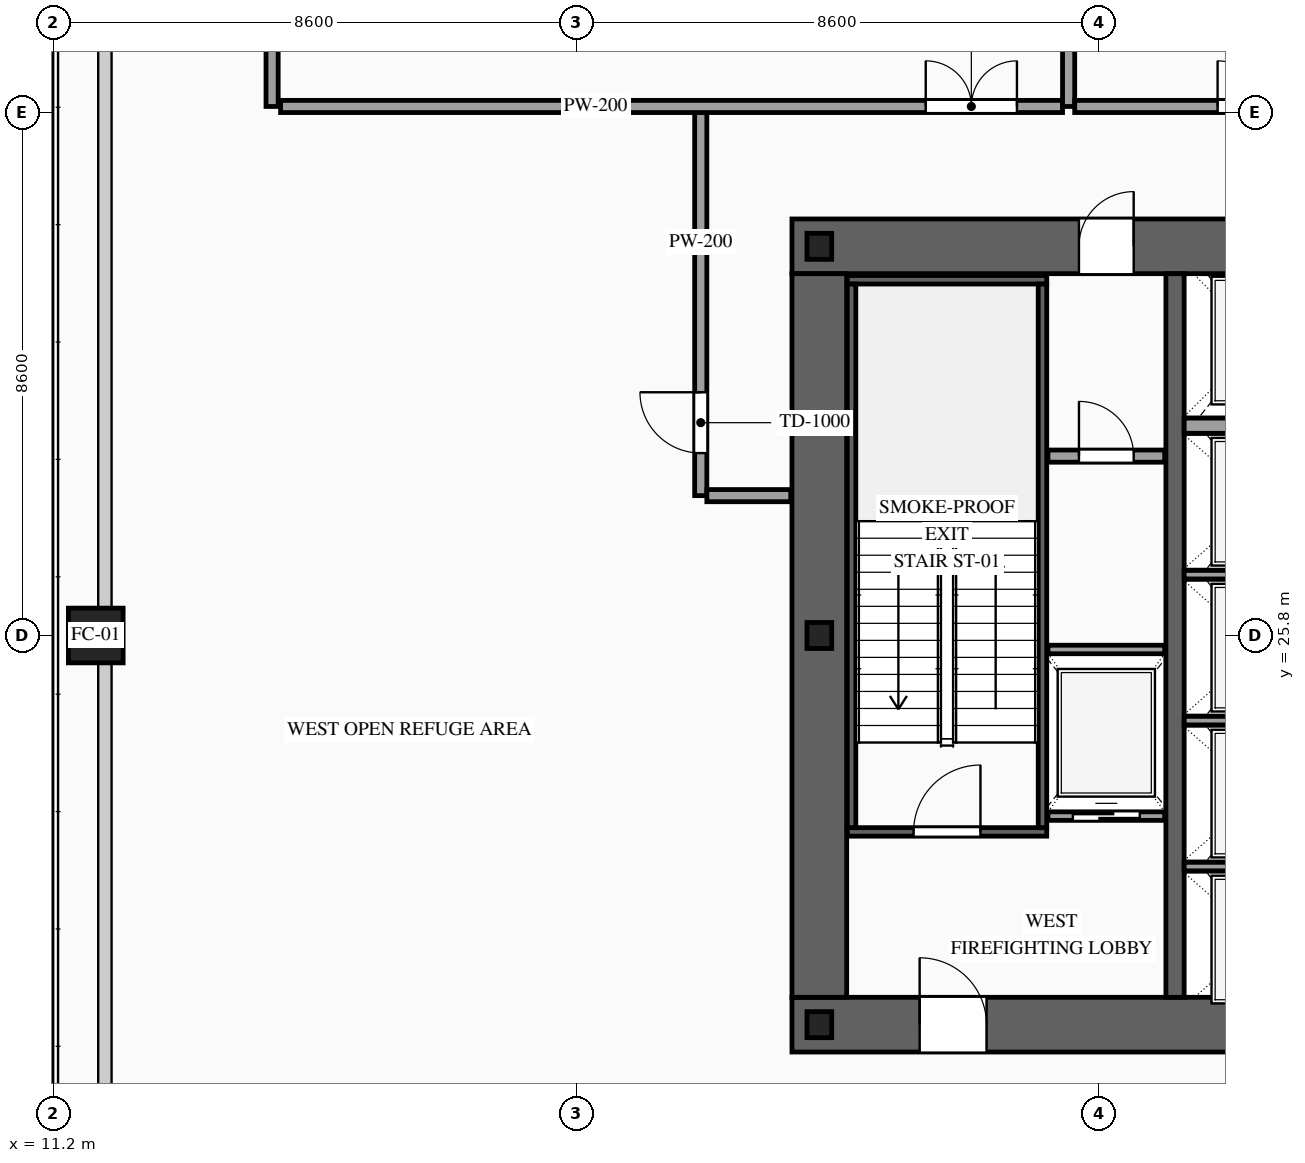
"""IFC4 building model, lengths in metres.
Left out: names, types, materials, properties, quantities, classifications, styles, units other than length and angle.
Written with IfcOpenShell. Run it as: python <this file> out.ifc"""

import sys

from ifc_helpers import new_model, si_unit, direction, frame, frame_2d, origin, origin_2d, place, context, subcontext, project, spatial, rectangle, hollow_rectangle, i_section, extrude, source, transform, mapped, element, fill, save


model = new_model("IFC4")
c1 = context("Model", 3, precision=1e-05, world=origin(), true_north=direction((0.0, 1.0)))
c2 = subcontext(c1, "Body", "Model", "MODEL_VIEW")
j1 = project(units=[si_unit("LENGTHUNIT", "METRE"), si_unit("PLANEANGLEUNIT", "RADIAN")], contexts=[c1])
p1 = place(None, origin())
s1 = spatial("IfcSite", under=j1, at=p1, CompositionType="ELEMENT")
p2 = place(p1, origin())
s2 = spatial("IfcBuilding", under=s1, at=p2, CompositionType="ELEMENT")
p3 = place(p2, frame((0.0, 0.0, 41.4)))
s3 = spatial("IfcBuildingStorey", under=s2, at=p3, CompositionType="ELEMENT", Elevation=41.4)
p4 = place(p3, frame((23.35, 19.4, 0.0), z_axis=(0.0, 0.0, 1.0), x_axis=(1.0, 0.0, 0.0)))
e1 = element("IfcWall", 1, at=p4, inside=s3, PredefinedType="SHEAR", context=c2, shape_type="SweptSolid", body=[
    extrude(rectangle(XDim=27.3, YDim=0.9, at=frame_2d((13.65, 0.0))), origin(), (0.0, 0.0, 1.0), 4.6),
])
p5 = place(p4, frame((2.1, 0.0, 0.0)))
e2 = element("IfcOpeningElement", 2, at=p5, cuts=e1, PredefinedType="OPENING", context=c2, shape_type="SweptSolid", body=[
    extrude(rectangle(XDim=1.1, YDim=2.2, at=frame_2d((0.55, 1.1))), frame((0.0, 0.465, 0.0), z_axis=(0.0, -1.0, 0.0), x_axis=(1.0, 0.0, 0.0)), (0.0, 0.0, 1.0), 0.93),
])
p6 = place(p4, frame((10.0, 0.0, 0.0)))
e3 = element("IfcOpeningElement", 3, at=p6, cuts=e1, PredefinedType="OPENING", context=c2, shape_type="SweptSolid", body=[
    extrude(rectangle(XDim=1.1, YDim=2.2, at=frame_2d((0.55, 1.1))), frame((0.0, 0.465, 0.0), z_axis=(0.0, -1.0, 0.0), x_axis=(1.0, 0.0, 0.0)), (0.0, 0.0, 1.0), 0.93),
])
p7 = place(p4, frame((23.2, 0.0, 0.0)))
e4 = element("IfcOpeningElement", 4, at=p7, cuts=e1, PredefinedType="OPENING", context=c2, shape_type="SweptSolid", body=[
    extrude(rectangle(XDim=1.1, YDim=2.2, at=frame_2d((0.55, 1.1))), frame((0.0, 0.465, 0.0), z_axis=(0.0, -1.0, 0.0), x_axis=(1.0, 0.0, 0.0)), (0.0, 0.0, 1.0), 0.93),
])
p8 = place(p4, frame((19.82, 0.0, 0.0)))
e5 = element("IfcOpeningElement", 5, at=p8, cuts=e1, PredefinedType="OPENING", context=c2, shape_type="SweptSolid", body=[
    extrude(rectangle(XDim=0.9, YDim=2.15, at=frame_2d((0.45, 1.075))), frame((0.0, 0.465, 0.0), z_axis=(0.0, -1.0, 0.0), x_axis=(1.0, 0.0, 0.0)), (0.0, 0.0, 1.0), 0.93),
])
p9 = place(p3, frame((23.35, 32.2, 0.0), z_axis=(0.0, 0.0, 1.0), x_axis=(1.0, 0.0, 0.0)))
e6 = element("IfcWall", 6, at=p9, inside=s3, PredefinedType="SHEAR", context=c2, shape_type="SweptSolid", body=[
    extrude(rectangle(XDim=27.3, YDim=0.9, at=frame_2d((13.65, 0.0))), origin(), (0.0, 0.0, 1.0), 4.6),
])
p10 = place(p9, frame((4.72, 0.0, 0.0)))
e7 = element("IfcOpeningElement", 7, at=p10, cuts=e6, PredefinedType="OPENING", context=c2, shape_type="SweptSolid", body=[
    extrude(rectangle(XDim=0.9, YDim=2.15, at=frame_2d((0.45, 1.075))), frame((0.0, 0.465, 0.0), z_axis=(0.0, -1.0, 0.0), x_axis=(1.0, 0.0, 0.0)), (0.0, 0.0, 1.0), 0.93),
])
p11 = place(p9, frame((10.0, 0.0, 0.0)))
e8 = element("IfcOpeningElement", 8, at=p11, cuts=e6, PredefinedType="OPENING", context=c2, shape_type="SweptSolid", body=[
    extrude(rectangle(XDim=1.1, YDim=2.2, at=frame_2d((0.55, 1.1))), frame((0.0, 0.465, 0.0), z_axis=(0.0, -1.0, 0.0), x_axis=(1.0, 0.0, 0.0)), (0.0, 0.0, 1.0), 0.93),
])
p12 = place(p9, frame((15.85, 0.0, 0.0)))
e9 = element("IfcOpeningElement", 9, at=p12, cuts=e6, PredefinedType="OPENING", context=c2, shape_type="SweptSolid", body=[
    extrude(rectangle(XDim=1.1, YDim=2.2, at=frame_2d((0.55, 1.1))), frame((0.0, 0.465, 0.0), z_axis=(0.0, -1.0, 0.0), x_axis=(1.0, 0.0, 0.0)), (0.0, 0.0, 1.0), 0.93),
])
p13 = place(p9, frame((19.05, 0.0, 0.0)))
e10 = element("IfcOpeningElement", 10, at=p13, cuts=e6, PredefinedType="OPENING", context=c2, shape_type="SweptSolid", body=[
    extrude(rectangle(XDim=0.9, YDim=2.15, at=frame_2d((0.45, 1.075))), frame((0.0, 0.465, 0.0), z_axis=(0.0, -1.0, 0.0), x_axis=(1.0, 0.0, 0.0)), (0.0, 0.0, 1.0), 0.93),
])
m1 = source(origin(), c2, "Body", "SweptSolid", [
    extrude(rectangle(XDim=11.9, YDim=0.9, at=frame_2d((5.95, 0.0))), origin(), (0.0, 0.0, 1.0), 4.6),
])
p14 = place(p3, frame((23.8, 19.85, 0.0), z_axis=(0.0, 0.0, 1.0), x_axis=(0.0, 1.0, 0.0)))
e11 = element("IfcWall", 11, at=p14, inside=s3, PredefinedType="SHEAR", context=c2, shape_type="MappedRepresentation", body=[
    mapped(m1, transform((0.0, 0.0, 0.0), scale=1.0)),
])
m2 = source(origin(), c2, "Body", "SweptSolid", [
    extrude(rectangle(XDim=11.9, YDim=0.3, at=frame_2d((5.95, 0.0))), origin(), (0.0, 0.0, 1.0), 4.6),
])
p15 = place(p3, frame((29.65, 19.85, 0.0), z_axis=(0.0, 0.0, 1.0), x_axis=(0.0, 1.0, 0.0)))
e12 = element("IfcWall", 12, at=p15, inside=s3, PredefinedType="SOLIDWALL", context=c2, shape_type="MappedRepresentation", body=[
    mapped(m2, transform((0.0, 0.0, 0.0), scale=1.0)),
])
m3 = source(origin(), c2, "Body", "SweptSolid", [
    extrude(i_section(OverallWidth=0.407, OverallDepth=0.428, WebThickness=0.02, FlangeThickness=0.035, at=origin_2d()), origin(), (0.0, 0.0, 1.0), 4.6),
])
for number, where, z_axis, x_axis in (
    (13, (23.8, 19.4, 0.0), (0.0, 0.0, 1.0), (1.0, 0.0, 0.0)),
    (14, (23.8, 25.8, 0.0), (0.0, 0.0, 1.0), (1.0, 0.0, 0.0)),
    (15, (23.8, 32.2, 0.0), (0.0, 0.0, 1.0), (1.0, 0.0, 0.0)),
):
    element("IfcColumn", number, at=place(p3, frame(where, z_axis=z_axis, x_axis=x_axis)), inside=s3, PredefinedType="COLUMN", context=c2, shape_type="MappedRepresentation", body=[
        mapped(m3, transform((0.0, 0.0, 0.0), scale=1.0)),
    ])
m4 = source(origin(), c2, "Body", "SweptSolid", [
    extrude(hollow_rectangle(XDim=0.9, YDim=0.9, WallThickness=0.042, at=origin_2d()), origin(), (0.0, 0.0, 1.0), 4.6),
])
p16 = place(p3, frame((11.9, 25.8, 0.0), z_axis=(0.0, 0.0, 1.0), x_axis=(1.0, 0.0, 0.0)))
e16 = element("IfcColumn", 16, at=p16, inside=s3, PredefinedType="COLUMN", context=c2, shape_type="MappedRepresentation", body=[
    mapped(m4, transform((0.0, 0.0, 0.0), scale=1.0)),
])
p17 = place(p3, frame((27.56, 22.83, 0.0), z_axis=(0.0, 0.0, 1.0), x_axis=(1.0, 0.0, 0.0)))
e17 = element("IfcWall", 17, at=p17, inside=s3, PredefinedType="SOLIDWALL", context=c2, shape_type="SweptSolid", body=[
    extrude(rectangle(XDim=1.92, YDim=0.14, at=frame_2d((0.96, 0.0))), origin(), (0.0, 0.0, 1.0), 4.38),
])
p18 = place(p17, frame((0.41, 0.0, 0.0)))
e18 = element("IfcOpeningElement", 18, at=p18, cuts=e17, PredefinedType="OPENING", context=c2, shape_type="SweptSolid", body=[
    extrude(rectangle(XDim=1.1, YDim=2.2, at=frame_2d((0.55, 1.1))), frame((0.0, 0.085, 0.0), z_axis=(0.0, -1.0, 0.0), x_axis=(1.0, 0.0, 0.0)), (0.0, 0.0, 1.0), 0.17),
])
m5 = source(origin(), c2, "Body", "SweptSolid", [
    extrude(rectangle(XDim=1.92, YDim=0.14, at=frame_2d((0.96, 0.0))), origin(), (0.0, 0.0, 1.0), 4.38),
])
p19 = place(p3, frame((27.56, 25.57, 0.0), z_axis=(0.0, 0.0, 1.0), x_axis=(1.0, 0.0, 0.0)))
e19 = element("IfcWall", 19, at=p19, inside=s3, PredefinedType="SOLIDWALL", context=c2, shape_type="MappedRepresentation", body=[
    mapped(m5, transform((0.0, 0.0, 0.0), scale=1.0)),
])
m6 = source(origin(), c2, "Body", "SweptSolid", [
    extrude(rectangle(XDim=2.5, YDim=0.14, at=frame_2d((1.25, 0.0))), origin(), (0.0, 0.0, 1.0), 4.38),
])
for number, where, z_axis, x_axis in (
    (20, (29.8, 22.0, 0.0), (0.0, 0.0, 1.0), (1.0, 0.0, 0.0)),
    (21, (29.8, 24.4, 0.0), (0.0, 0.0, 1.0), (1.0, 0.0, 0.0)),
    (22, (29.8, 26.8, 0.0), (0.0, 0.0, 1.0), (1.0, 0.0, 0.0)),
):
    element("IfcWall", number, at=place(p3, frame(where, z_axis=z_axis, x_axis=x_axis)), inside=s3, PredefinedType="SOLIDWALL", context=c2, shape_type="MappedRepresentation", body=[
        mapped(m6, transform((0.0, 0.0, 0.0), scale=1.0)),
    ])
m7 = source(origin(), c2, "Body", "SweptSolid", [
    extrude(rectangle(XDim=2.5, YDim=0.25, at=frame_2d((1.25, 0.0))), origin(), (0.0, 0.0, 1.0), 4.38),
])
p20 = place(p3, frame((29.8, 29.25, 0.0), z_axis=(0.0, 0.0, 1.0), x_axis=(1.0, 0.0, 0.0)))
e23 = element("IfcWall", 23, at=p20, inside=s3, PredefinedType="SOLIDWALL", context=c2, shape_type="MappedRepresentation", body=[
    mapped(m7, transform((0.0, 0.0, 0.0), scale=1.0)),
])
p21 = place(p3, frame((24.26, 22.57, 0.0), z_axis=(0.0, 0.0, 1.0), x_axis=(1.0, 0.0, 0.0)))
e24 = element("IfcWall", 24, at=p21, inside=s3, PredefinedType="SOLIDWALL", context=c2, shape_type="SweptSolid", body=[
    extrude(rectangle(XDim=3.28, YDim=0.14, at=frame_2d((1.64, 0.0))), origin(), (0.0, 0.0, 1.0), 4.38),
])
p22 = place(p21, frame((1.09, 0.0, 0.0)))
e25 = element("IfcOpeningElement", 25, at=p22, cuts=e24, PredefinedType="OPENING", context=c2, shape_type="SweptSolid", body=[
    extrude(rectangle(XDim=1.1, YDim=2.2, at=frame_2d((0.55, 1.1))), frame((0.0, 0.085, 0.0), z_axis=(0.0, -1.0, 0.0), x_axis=(1.0, 0.0, 0.0)), (0.0, 0.0, 1.0), 0.17),
])
m8 = source(origin(), c2, "Body", "SweptSolid", [
    extrude(rectangle(XDim=3.28, YDim=0.14, at=frame_2d((1.64, 0.0))), origin(), (0.0, 0.0, 1.0), 4.38),
])
p23 = place(p3, frame((24.26, 31.65, 0.0), z_axis=(0.0, 0.0, 1.0), x_axis=(1.0, 0.0, 0.0)))
e26 = element("IfcWall", 26, at=p23, inside=s3, PredefinedType="SOLIDWALL", context=c2, shape_type="MappedRepresentation", body=[
    mapped(m8, transform((0.0, 0.0, 0.0), scale=1.0)),
])
m9 = source(origin(), c2, "Body", "SweptSolid", [
    extrude(rectangle(XDim=8.94, YDim=0.14, at=frame_2d((4.47, 0.0))), origin(), (0.0, 0.0, 1.0), 4.38),
])
for number, where, z_axis, x_axis in (
    (27, (24.33, 22.64, 0.0), (0.0, 0.0, 1.0), (0.0, 1.0, 0.0)),
    (28, (27.47, 22.64, 0.0), (0.0, 0.0, 1.0), (0.0, 1.0, 0.0)),
):
    element("IfcWall", number, at=place(p3, frame(where, z_axis=z_axis, x_axis=x_axis)), inside=s3, PredefinedType="SOLIDWALL", context=c2, shape_type="MappedRepresentation", body=[
        mapped(m9, transform((0.0, 0.0, 0.0), scale=1.0)),
    ])
p24 = place(p3, frame((27.56, 28.75, 0.0), z_axis=(0.0, 0.0, 1.0), x_axis=(1.0, 0.0, 0.0)))
e29 = element("IfcWall", 29, at=p24, inside=s3, PredefinedType="PARTITIONING", context=c2, shape_type="SweptSolid", body=[
    extrude(rectangle(XDim=1.92, YDim=0.2, at=frame_2d((0.96, 0.0))), origin(), (0.0, 0.0, 1.0), 4.38),
])
p25 = place(p24, frame((0.51, 0.0, 0.0)))
e30 = element("IfcOpeningElement", 30, at=p25, cuts=e29, PredefinedType="OPENING", context=c2, shape_type="SweptSolid", body=[
    extrude(rectangle(XDim=0.9, YDim=2.15, at=frame_2d((0.45, 1.075))), frame((0.0, 0.115, 0.0), z_axis=(0.0, -1.0, 0.0), x_axis=(1.0, 0.0, 0.0)), (0.0, 0.0, 1.0), 0.23),
])
m10 = source(origin(), c2, "Body", "SweptSolid", [
    extrude(rectangle(XDim=16.1, YDim=0.2, at=frame_2d((8.05, 0.0))), origin(), (0.0, 0.0, 1.0), 4.38),
])
p26 = place(p3, frame((14.8, 34.5, 0.0), z_axis=(0.0, 0.0, 1.0), x_axis=(0.0, 1.0, 0.0)))
e31 = element("IfcWall", 31, at=p26, inside=s3, PredefinedType="PARTITIONING", context=c2, shape_type="MappedRepresentation", body=[
    mapped(m10, transform((0.0, 0.0, 0.0), scale=1.0)),
])
p27 = place(p3, frame((21.85, 28.1, 0.0), z_axis=(0.0, 0.0, 1.0), x_axis=(0.0, 1.0, 0.0)))
e32 = element("IfcWall", 32, at=p27, inside=s3, PredefinedType="PARTITIONING", context=c2, shape_type="SweptSolid", body=[
    extrude(rectangle(XDim=6.4, YDim=0.2, at=frame_2d((3.2, 0.0))), origin(), (0.0, 0.0, 1.0), 4.38),
])
p28 = place(p27, frame((0.7, 0.0, 0.0)))
e33 = element("IfcOpeningElement", 33, at=p28, cuts=e32, PredefinedType="OPENING", context=c2, shape_type="SweptSolid", body=[
    extrude(rectangle(XDim=1.0, YDim=2.2, at=frame_2d((0.5, 1.1))), frame((0.0, 0.115, 0.0), z_axis=(0.0, -1.0, 0.0), x_axis=(1.0, 0.0, 0.0)), (0.0, 0.0, 1.0), 0.23),
])
m11 = source(origin(), c2, "Body", "SweptSolid", [
    extrude(rectangle(XDim=1.38, YDim=0.2, at=frame_2d((0.69, 0.0))), origin(), (0.0, 0.0, 1.0), 4.38),
])
p29 = place(p3, frame((21.95, 28.1, 0.0), z_axis=(0.0, 0.0, 1.0), x_axis=(1.0, 0.0, 0.0)))
e34 = element("IfcWall", 34, at=p29, inside=s3, PredefinedType="PARTITIONING", context=c2, shape_type="MappedRepresentation", body=[
    mapped(m11, transform((0.0, 0.0, 0.0), scale=1.0)),
])
p30 = place(p3, frame((14.94, 34.5, 0.0), z_axis=(0.0, 0.0, 1.0), x_axis=(1.0, 0.0, 0.0)))
e35 = element("IfcWall", 35, at=p30, inside=s3, PredefinedType="PARTITIONING", context=c2, shape_type="SweptSolid", body=[
    extrude(rectangle(XDim=12.86, YDim=0.2, at=frame_2d((6.43, 0.0))), origin(), (0.0, 0.0, 1.0), 4.38),
])
p31 = place(p30, frame((10.61, 0.0, 0.0)))
e36 = element("IfcOpeningElement", 36, at=p31, cuts=e35, PredefinedType="OPENING", context=c2, shape_type="SweptSolid", body=[
    extrude(rectangle(XDim=1.5, YDim=2.3, at=frame_2d((0.75, 1.15))), frame((0.0, 0.115, 0.0), z_axis=(0.0, -1.0, 0.0), x_axis=(1.0, 0.0, 0.0)), (0.0, 0.0, 1.0), 0.23),
])
p32 = place(p3, frame((27.9, 34.5, 0.0), z_axis=(0.0, 0.0, 1.0), x_axis=(0.0, 1.0, 0.0)))
e37 = element("IfcWall", 37, at=p32, inside=s3, PredefinedType="PARTITIONING", context=c2, shape_type="MappedRepresentation", body=[
    mapped(m10, transform((0.0, 0.0, 0.0), scale=1.0)),
])
p33 = place(p3, frame((28.0, 34.5, 0.0), z_axis=(0.0, 0.0, 1.0), x_axis=(1.0, 0.0, 0.0)))
e38 = element("IfcWall", 38, at=p33, inside=s3, PredefinedType="PARTITIONING", context=c2, shape_type="SweptSolid", body=[
    extrude(rectangle(XDim=6.2, YDim=0.2, at=frame_2d((3.1, 0.0))), origin(), (0.0, 0.0, 1.0), 4.38),
])
p34 = place(p33, frame((2.35, 0.0, 0.0)))
e39 = element("IfcOpeningElement", 39, at=p34, cuts=e38, PredefinedType="OPENING", context=c2, shape_type="SweptSolid", body=[
    extrude(rectangle(XDim=1.5, YDim=2.3, at=frame_2d((0.75, 1.15))), frame((0.0, 0.115, 0.0), z_axis=(0.0, -1.0, 0.0), x_axis=(1.0, 0.0, 0.0)), (0.0, 0.0, 1.0), 0.23),
])
m12 = source(origin(), c2, "Body", "SweptSolid", [
    extrude(rectangle(XDim=1.1, YDim=2.2, at=frame_2d((0.55, 1.1))), frame((0.0, 0.025, 0.0), z_axis=(0.0, -1.0, 0.0), x_axis=(1.0, 0.0, 0.0)), (0.0, 0.0, 1.0), 0.05),
])
p35 = place(p18, origin())
e40 = element("IfcDoor", 40, at=p35, inside=s3, OperationType="SLIDING_TO_LEFT", PredefinedType="DOOR", context=c2, shape_type="MappedRepresentation", body=[
    mapped(m12, transform((0.0, 0.0, 0.0), scale=1.0)),
])
fill(e18, e40)
m13 = source(origin(), c2, "Body", "SweptSolid", [
    extrude(rectangle(XDim=1.1, YDim=2.2, at=frame_2d((0.55, 1.1))), frame((0.0, 0.025, 0.0), z_axis=(0.0, -1.0, 0.0), x_axis=(1.0, 0.0, 0.0)), (0.0, 0.0, 1.0), 0.05),
])
p36 = place(p22, origin())
e41 = element("IfcDoor", 41, at=p36, inside=s3, OperationType="SINGLE_SWING_RIGHT", PredefinedType="DOOR", context=c2, shape_type="MappedRepresentation", body=[
    mapped(m13, transform((0.0, 0.0, 0.0), scale=1.0)),
])
fill(e25, e41)
p37 = place(p5, origin())
e42 = element("IfcDoor", 42, at=p37, inside=s3, OperationType="SINGLE_SWING_LEFT", PredefinedType="DOOR", context=c2, shape_type="MappedRepresentation", body=[
    mapped(m13, transform((0.0, 0.0, 0.0), scale=1.0)),
])
fill(e2, e42)
m14 = source(origin(), c2, "Body", "SweptSolid", [
    extrude(rectangle(XDim=0.9, YDim=2.15, at=frame_2d((0.45, 1.075))), frame((0.0, 0.025, 0.0), z_axis=(0.0, -1.0, 0.0), x_axis=(1.0, 0.0, 0.0)), (0.0, 0.0, 1.0), 0.05),
])
p38 = place(p10, origin())
e43 = element("IfcDoor", 43, at=p38, inside=s3, OperationType="SINGLE_SWING_RIGHT", PredefinedType="DOOR", context=c2, shape_type="MappedRepresentation", body=[
    mapped(m14, transform((0.0, 0.0, 0.0), scale=1.0)),
])
fill(e7, e43)
p39 = place(p25, origin())
e44 = element("IfcDoor", 44, at=p39, inside=s3, OperationType="SINGLE_SWING_LEFT", PredefinedType="DOOR", context=c2, shape_type="MappedRepresentation", body=[
    mapped(m14, transform((0.0, 0.0, 0.0), scale=1.0)),
])
fill(e30, e44)
m15 = source(origin(), c2, "Body", "SweptSolid", [
    extrude(rectangle(XDim=1.0, YDim=2.2, at=frame_2d((0.5, 1.1))), frame((0.0, 0.025, 0.0), z_axis=(0.0, -1.0, 0.0), x_axis=(1.0, 0.0, 0.0)), (0.0, 0.0, 1.0), 0.05),
])
p40 = place(p28, origin())
e45 = element("IfcDoor", 45, at=p40, inside=s3, OperationType="SINGLE_SWING_RIGHT", PredefinedType="DOOR", context=c2, shape_type="MappedRepresentation", body=[
    mapped(m15, transform((0.0, 0.0, 0.0), scale=1.0)),
])
fill(e33, e45)
m16 = source(origin(), c2, "Body", "SweptSolid", [
    extrude(rectangle(XDim=1.5, YDim=2.3, at=frame_2d((0.75, 1.15))), frame((0.0, 0.025, 0.0), z_axis=(0.0, -1.0, 0.0), x_axis=(1.0, 0.0, 0.0)), (0.0, 0.0, 1.0), 0.05),
])
p41 = place(p31, origin())
e46 = element("IfcDoor", 46, at=p41, inside=s3, OperationType="DOUBLE_DOOR_SINGLE_SWING", PredefinedType="DOOR", context=c2, shape_type="MappedRepresentation", body=[
    mapped(m16, transform((0.0, 0.0, 0.0), scale=1.0)),
])
fill(e36, e46)
p42 = place(p34, origin())
e47 = element("IfcDoor", 47, at=p42, inside=s3, OperationType="DOUBLE_DOOR_SINGLE_SWING", PredefinedType="DOOR", context=c2, shape_type="MappedRepresentation", body=[
    mapped(m16, transform((0.0, 0.0, 0.0), scale=1.0)),
])
fill(e39, e47)
save(model, sys.argv[1])
